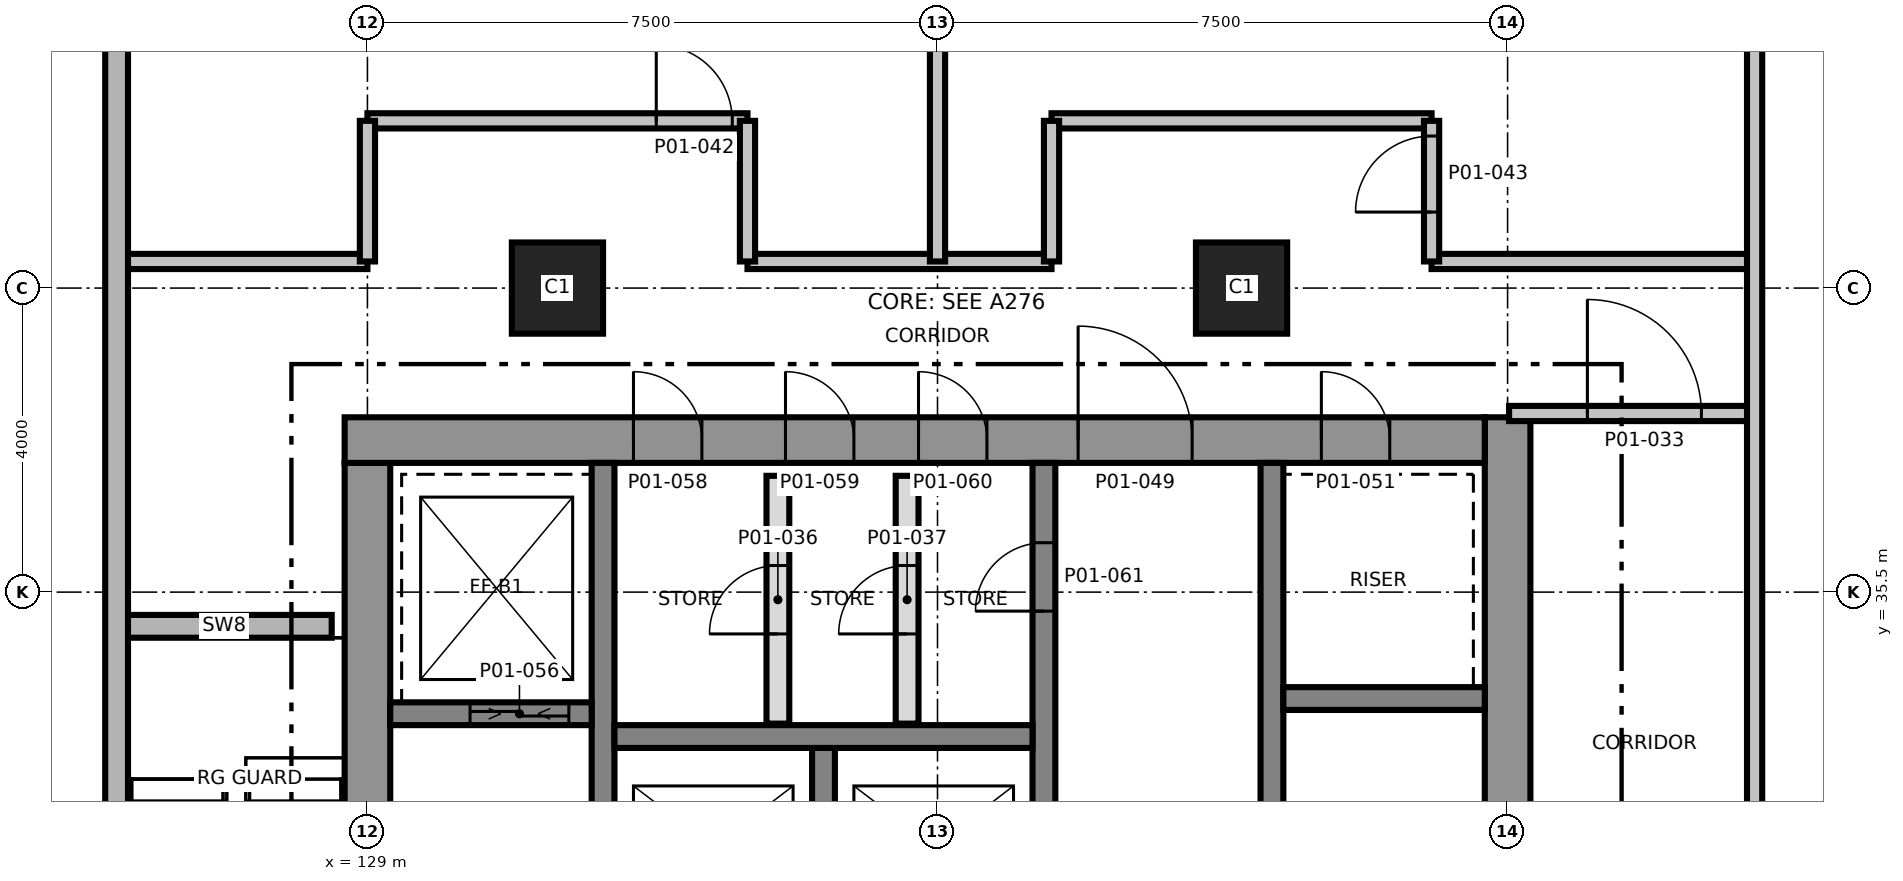
"""IFC4 building model, lengths in metres.
Left out: names, types, materials, properties, quantities, classifications, styles, units other than length and angle.
Written with IfcOpenShell. Run it as: python <this file> out.ifc"""

import sys

from ifc_helpers import new_model, si_unit, direction, frame, frame_2d, origin, origin_2d, place, context, subcontext, project, spatial, rectangle, extrude, element, fill, save


model = new_model("IFC4")
c1 = context("Model", 3, precision=1e-05, world=origin(), true_north=direction((0.0, 1.0)))
c2 = subcontext(c1, "Body", "Model", "MODEL_VIEW")
j1 = project(units=[si_unit("LENGTHUNIT", "METRE"), si_unit("PLANEANGLEUNIT", "RADIAN")], contexts=[c1])
p1 = place(None, origin())
s1 = spatial("IfcSite", under=j1, at=p1, CompositionType="ELEMENT")
p2 = place(p1, origin())
s2 = spatial("IfcBuilding", under=s1, at=p2, CompositionType="ELEMENT")
p3 = place(p2, frame((0.0, 0.0, 8.0)))
s3 = spatial("IfcBuildingStorey", under=s2, at=p3, CompositionType="ELEMENT", Elevation=8.0)
p4 = place(p3, frame((129.0, 24.8, 0.0), z_axis=(0.0, 0.0, 1.0), x_axis=(0.0, 1.0, 0.0)))
e1 = element("IfcWall", 1, at=p4, inside=s3, PredefinedType="SHEAR", context=c2, shape_type="SweptSolid", body=[
    extrude(rectangle(XDim=12.4, YDim=0.6, at=frame_2d((6.2, 0.0))), origin(), (0.0, 0.0, 1.0), 5.5),
])
p5 = place(p4, frame((5.15, 0.0, 0.0)))
e2 = element("IfcOpeningElement", 2, at=p5, cuts=e1, PredefinedType="OPENING", context=c2, shape_type="SweptSolid", body=[
    extrude(rectangle(XDim=1.0, YDim=2.1, at=frame_2d((0.5, 1.05))), frame((0.0, 0.31, 0.0), z_axis=(0.0, -1.0, 0.0), x_axis=(1.0, 0.0, 0.0)), (0.0, 0.0, 1.0), 0.62),
])
p6 = place(p3, frame((144.0, 24.2, 0.0), z_axis=(0.0, 0.0, 1.0), x_axis=(0.0, 1.0, 0.0)))
e3 = element("IfcWall", 3, at=p6, inside=s3, PredefinedType="SHEAR", context=c2, shape_type="SweptSolid", body=[
    extrude(rectangle(XDim=13.6, YDim=0.6, at=frame_2d((6.8, 0.0))), origin(), (0.0, 0.0, 1.0), 5.5),
])
p7 = place(p3, frame((128.7, 37.5, 0.0), z_axis=(0.0, 0.0, 1.0), x_axis=(1.0, 0.0, 0.0)))
e4 = element("IfcWall", 4, at=p7, inside=s3, PredefinedType="SHEAR", context=c2, shape_type="SweptSolid", body=[
    extrude(rectangle(XDim=15.0, YDim=0.6, at=frame_2d((7.5, 0.0))), origin(), (0.0, 0.0, 1.0), 5.5),
])
p8 = place(p7, frame((9.65, 0.0, 0.0)))
e5 = element("IfcOpeningElement", 5, at=p8, cuts=e4, PredefinedType="OPENING", context=c2, shape_type="SweptSolid", body=[
    extrude(rectangle(XDim=1.5, YDim=2.1, at=frame_2d((0.75, 1.05))), frame((0.0, 0.31, 0.0), z_axis=(0.0, -1.0, 0.0), x_axis=(1.0, 0.0, 0.0)), (0.0, 0.0, 1.0), 0.62),
])
p9 = place(p7, frame((12.85, 0.0, 0.0)))
e6 = element("IfcOpeningElement", 6, at=p9, cuts=e4, PredefinedType="OPENING", context=c2, shape_type="SweptSolid", body=[
    extrude(rectangle(XDim=0.9, YDim=2.1, at=frame_2d((0.45, 1.05))), frame((0.0, 0.31, 0.0), z_axis=(0.0, -1.0, 0.0), x_axis=(1.0, 0.0, 0.0)), (0.0, 0.0, 1.0), 0.62),
])
p10 = place(p7, frame((3.8, 0.0, 0.0)))
e7 = element("IfcOpeningElement", 7, at=p10, cuts=e4, PredefinedType="OPENING", context=c2, shape_type="SweptSolid", body=[
    extrude(rectangle(XDim=0.9, YDim=2.1, at=frame_2d((0.45, 1.05))), frame((0.0, 0.31, 0.0), z_axis=(0.0, -1.0, 0.0), x_axis=(1.0, 0.0, 0.0)), (0.0, 0.0, 1.0), 0.62),
])
p11 = place(p7, frame((5.8, 0.0, 0.0)))
e8 = element("IfcOpeningElement", 8, at=p11, cuts=e4, PredefinedType="OPENING", context=c2, shape_type="SweptSolid", body=[
    extrude(rectangle(XDim=0.9, YDim=2.1, at=frame_2d((0.45, 1.05))), frame((0.0, 0.31, 0.0), z_axis=(0.0, -1.0, 0.0), x_axis=(1.0, 0.0, 0.0)), (0.0, 0.0, 1.0), 0.62),
])
p12 = place(p7, frame((7.55, 0.0, 0.0)))
e9 = element("IfcOpeningElement", 9, at=p12, cuts=e4, PredefinedType="OPENING", context=c2, shape_type="SweptSolid", body=[
    extrude(rectangle(XDim=0.9, YDim=2.1, at=frame_2d((0.45, 1.05))), frame((0.0, 0.31, 0.0), z_axis=(0.0, -1.0, 0.0), x_axis=(1.0, 0.0, 0.0)), (0.0, 0.0, 1.0), 0.62),
])
p13 = place(p3, frame((132.1, 24.8, 0.0), z_axis=(0.0, 0.0, 1.0), x_axis=(0.0, 1.0, 0.0)))
e10 = element("IfcWall", 10, at=p13, inside=s3, PredefinedType="SHEAR", context=c2, shape_type="SweptSolid", body=[
    extrude(rectangle(XDim=12.4, YDim=0.3, at=frame_2d((6.2, 0.0))), origin(), (0.0, 0.0, 1.0), 5.5),
])
p14 = place(p13, frame((3.9, 0.0, 0.0)))
e11 = element("IfcOpeningElement", 11, at=p14, cuts=e10, PredefinedType="OPENING", context=c2, shape_type="SweptSolid", body=[
    extrude(rectangle(XDim=1.2, YDim=2.1, at=frame_2d((0.6, 1.05))), frame((0.0, 0.16, 0.0), z_axis=(0.0, -1.0, 0.0), x_axis=(1.0, 0.0, 0.0)), (0.0, 0.0, 1.0), 0.32),
])
p15 = place(p3, frame((137.9, 24.8, 0.0), z_axis=(0.0, 0.0, 1.0), x_axis=(0.0, 1.0, 0.0)))
e12 = element("IfcWall", 12, at=p15, inside=s3, PredefinedType="SHEAR", context=c2, shape_type="SweptSolid", body=[
    extrude(rectangle(XDim=12.4, YDim=0.3, at=frame_2d((6.2, 0.0))), origin(), (0.0, 0.0, 1.0), 5.5),
])
p16 = place(p15, frame((3.95, 0.0, 0.0)))
e13 = element("IfcOpeningElement", 13, at=p16, cuts=e12, PredefinedType="OPENING", context=c2, shape_type="SweptSolid", body=[
    extrude(rectangle(XDim=1.5, YDim=2.1, at=frame_2d((0.75, 1.05))), frame((0.0, 0.16, 0.0), z_axis=(0.0, -1.0, 0.0), x_axis=(1.0, 0.0, 0.0)), (0.0, 0.0, 1.0), 0.32),
])
p17 = place(p15, frame((10.45, 0.0, 0.0)))
e14 = element("IfcOpeningElement", 14, at=p17, cuts=e12, PredefinedType="OPENING", context=c2, shape_type="SweptSolid", body=[
    extrude(rectangle(XDim=0.9, YDim=2.1, at=frame_2d((0.45, 1.05))), frame((0.0, 0.16, 0.0), z_axis=(0.0, -1.0, 0.0), x_axis=(1.0, 0.0, 0.0)), (0.0, 0.0, 1.0), 0.32),
])
p18 = place(p3, frame((140.9, 24.8, 0.0), z_axis=(0.0, 0.0, 1.0), x_axis=(0.0, 1.0, 0.0)))
e15 = element("IfcWall", 15, at=p18, inside=s3, PredefinedType="SHEAR", context=c2, shape_type="SweptSolid", body=[
    extrude(rectangle(XDim=12.4, YDim=0.3, at=frame_2d((6.2, 0.0))), origin(), (0.0, 0.0, 1.0), 5.5),
])
p19 = place(p18, frame((5.9, 0.0, 0.0)))
e16 = element("IfcOpeningElement", 16, at=p19, cuts=e15, PredefinedType="OPENING", context=c2, shape_type="SweptSolid", body=[
    extrude(rectangle(XDim=1.2, YDim=2.1, at=frame_2d((0.6, 1.05))), frame((0.0, 0.16, 0.0), z_axis=(0.0, -1.0, 0.0), x_axis=(1.0, 0.0, 0.0)), (0.0, 0.0, 1.0), 0.32),
])
p20 = place(p3, frame((135.0, 30.85, 0.0), z_axis=(0.0, 0.0, 1.0), x_axis=(0.0, 1.0, 0.0)))
e17 = element("IfcWall", 17, at=p20, inside=s3, PredefinedType="SHEAR", context=c2, shape_type="SweptSolid", body=[
    extrude(rectangle(XDim=2.6, YDim=0.3, at=frame_2d((1.3, 0.0))), origin(), (0.0, 0.0, 1.0), 5.5),
])
p21 = place(p3, frame((132.25, 33.6, 0.0), z_axis=(0.0, 0.0, 1.0), x_axis=(1.0, 0.0, 0.0)))
e18 = element("IfcWall", 18, at=p21, inside=s3, PredefinedType="SHEAR", context=c2, shape_type="SweptSolid", body=[
    extrude(rectangle(XDim=5.5, YDim=0.3, at=frame_2d((2.75, 0.0))), origin(), (0.0, 0.0, 1.0), 5.5),
])
p22 = place(p3, frame((129.3, 33.9, 0.0), z_axis=(0.0, 0.0, 1.0), x_axis=(1.0, 0.0, 0.0)))
e19 = element("IfcWall", 19, at=p22, inside=s3, PredefinedType="SHEAR", context=c2, shape_type="SweptSolid", body=[
    extrude(rectangle(XDim=2.65, YDim=0.3, at=frame_2d((1.325, 0.0))), origin(), (0.0, 0.0, 1.0), 5.5),
])
p23 = place(p22, frame((1.05, 0.0, 0.0)))
e20 = element("IfcOpeningElement", 20, at=p23, cuts=e19, PredefinedType="OPENING", context=c2, shape_type="SweptSolid", body=[
    extrude(rectangle(XDim=1.3, YDim=2.4, at=frame_2d((0.65, 1.2))), frame((0.0, 0.16, 0.0), z_axis=(0.0, -1.0, 0.0), x_axis=(1.0, 0.0, 0.0)), (0.0, 0.0, 1.0), 0.32),
])
p24 = place(p3, frame((141.05, 34.1, 0.0), z_axis=(0.0, 0.0, 1.0), x_axis=(1.0, 0.0, 0.0)))
e21 = element("IfcWall", 21, at=p24, inside=s3, PredefinedType="SHEAR", context=c2, shape_type="SweptSolid", body=[
    extrude(rectangle(XDim=2.65, YDim=0.3, at=frame_2d((1.325, 0.0))), origin(), (0.0, 0.0, 1.0), 5.5),
])
for number, where, z_axis, x_axis in (
    (22, (131.5, 39.5, 0.0), (0.0, 0.0, 1.0), (1.0, 0.0, 0.0)),
    (23, (140.5, 39.5, 0.0), (0.0, 0.0, 1.0), (1.0, 0.0, 0.0)),
):
    element("IfcColumn", number, at=place(p3, frame(where, z_axis=z_axis, x_axis=x_axis)), inside=s3, PredefinedType="COLUMN", context=c2, shape_type="SweptSolid", body=[
        extrude(rectangle(XDim=1.2, YDim=1.2, at=origin_2d()), origin(), (0.0, 0.0, 1.0), 5.5),
    ])
p25 = place(p3, frame((125.7, 35.05, 0.0), z_axis=(0.0, 0.0, 1.0), x_axis=(1.0, 0.0, 0.0)))
e24 = element("IfcWall", 24, at=p25, inside=s3, PredefinedType="SHEAR", context=c2, shape_type="SweptSolid", body=[
    extrude(rectangle(XDim=2.83, YDim=0.3, at=frame_2d((1.415, 0.0))), origin(), (0.0, 0.0, 1.0), 5.2),
])
p26 = place(p3, frame((144.02, 37.85, 0.0), z_axis=(0.0, 0.0, 1.0), x_axis=(1.0, 0.0, 0.0)))
e25 = element("IfcWall", 25, at=p26, inside=s3, PredefinedType="PARTITIONING", context=c2, shape_type="SweptSolid", body=[
    extrude(rectangle(XDim=3.23, YDim=0.2, at=frame_2d((1.615, 0.0))), origin(), (0.0, 0.0, 1.0), 5.2),
])
p27 = place(p26, frame((1.03, 0.0, 0.0)))
e26 = element("IfcOpeningElement", 26, at=p27, cuts=e25, PredefinedType="OPENING", context=c2, shape_type="SweptSolid", body=[
    extrude(rectangle(XDim=1.5, YDim=2.1, at=frame_2d((0.75, 1.05))), frame((0.0, 0.11, 0.0), z_axis=(0.0, -1.0, 0.0), x_axis=(1.0, 0.0, 0.0)), (0.0, 0.0, 1.0), 0.22),
])
p28 = place(p3, frame((125.75, 39.85, 0.0), z_axis=(0.0, 0.0, 1.0), x_axis=(1.0, 0.0, 0.0)))
e27 = element("IfcWall", 27, at=p28, inside=s3, PredefinedType="PARTITIONING", context=c2, shape_type="SweptSolid", body=[
    extrude(rectangle(XDim=3.25, YDim=0.2, at=frame_2d((1.625, 0.0))), origin(), (0.0, 0.0, 1.0), 5.2),
])
p29 = place(p3, frame((134.0, 39.85, 0.0), z_axis=(0.0, 0.0, 1.0), x_axis=(1.0, 0.0, 0.0)))
e28 = element("IfcWall", 28, at=p29, inside=s3, PredefinedType="PARTITIONING", context=c2, shape_type="SweptSolid", body=[
    extrude(rectangle(XDim=4.0, YDim=0.2, at=frame_2d((2.0, 0.0))), origin(), (0.0, 0.0, 1.0), 5.2),
])
p30 = place(p3, frame((143.0, 39.85, 0.0), z_axis=(0.0, 0.0, 1.0), x_axis=(1.0, 0.0, 0.0)))
e29 = element("IfcWall", 29, at=p30, inside=s3, PredefinedType="PARTITIONING", context=c2, shape_type="SweptSolid", body=[
    extrude(rectangle(XDim=4.25, YDim=0.2, at=frame_2d((2.125, 0.0))), origin(), (0.0, 0.0, 1.0), 5.2),
])
p31 = place(p3, frame((129.0, 41.7, 0.0), z_axis=(0.0, 0.0, 1.0), x_axis=(1.0, 0.0, 0.0)))
e30 = element("IfcWall", 30, at=p31, inside=s3, PredefinedType="PARTITIONING", context=c2, shape_type="SweptSolid", body=[
    extrude(rectangle(XDim=5.0, YDim=0.2, at=frame_2d((2.5, 0.0))), origin(), (0.0, 0.0, 1.0), 5.2),
])
p32 = place(p31, frame((3.8, 0.0, 0.0)))
e31 = element("IfcOpeningElement", 31, at=p32, cuts=e30, PredefinedType="OPENING", context=c2, shape_type="SweptSolid", body=[
    extrude(rectangle(XDim=1.0, YDim=2.1, at=frame_2d((0.5, 1.05))), frame((0.0, 0.11, 0.0), z_axis=(0.0, -1.0, 0.0), x_axis=(1.0, 0.0, 0.0)), (0.0, 0.0, 1.0), 0.22),
])
p33 = place(p3, frame((138.0, 41.7, 0.0), z_axis=(0.0, 0.0, 1.0), x_axis=(1.0, 0.0, 0.0)))
e32 = element("IfcWall", 32, at=p33, inside=s3, PredefinedType="PARTITIONING", context=c2, shape_type="SweptSolid", body=[
    extrude(rectangle(XDim=5.0, YDim=0.2, at=frame_2d((2.5, 0.0))), origin(), (0.0, 0.0, 1.0), 5.2),
])
p34 = place(p3, frame((125.7, 11.07, 0.0), z_axis=(0.0, 0.0, 1.0), x_axis=(0.0, 1.0, 0.0)))
e33 = element("IfcWall", 33, at=p34, inside=s3, PredefinedType="SHEAR", context=c2, shape_type="SweptSolid", body=[
    extrude(rectangle(XDim=38.86, YDim=0.3, at=frame_2d((19.43, 0.0))), origin(), (0.0, 0.0, 1.0), 5.2),
])
p35 = place(p34, frame((14.194, 0.0, 0.0)))
e34 = element("IfcOpeningElement", 34, at=p35, cuts=e33, PredefinedType="OPENING", context=c2, shape_type="SweptSolid", body=[
    extrude(rectangle(XDim=1.0, YDim=2.1, at=frame_2d((0.5, 1.05))), frame((0.0, 0.16, 0.0), z_axis=(0.0, -1.0, 0.0), x_axis=(1.0, 0.0, 0.0)), (0.0, 0.0, 1.0), 0.32),
])
for number, where, z_axis, x_axis in (
    (35, (129.0, 39.85, 0.0), (0.0, 0.0, 1.0), (0.0, 1.0, 0.0)),
    (36, (134.0, 39.85, 0.0), (0.0, 0.0, 1.0), (0.0, 1.0, 0.0)),
):
    element("IfcWall", number, at=place(p3, frame(where, z_axis=z_axis, x_axis=x_axis)), inside=s3, PredefinedType="PARTITIONING", context=c2, shape_type="SweptSolid", body=[
        extrude(rectangle(XDim=1.85, YDim=0.2, at=frame_2d((0.925, 0.0))), origin(), (0.0, 0.0, 1.0), 5.2),
    ])
p36 = place(p3, frame((134.4, 33.77, 0.0), z_axis=(0.0, 0.0, 1.0), x_axis=(0.0, 1.0, 0.0)))
e37 = element("IfcWall", 37, at=p36, inside=s3, PredefinedType="PARTITIONING", context=c2, shape_type="SweptSolid", body=[
    extrude(rectangle(XDim=3.26, YDim=0.3, at=frame_2d((1.63, 0.0))), origin(), (0.0, 0.0, 1.0), 5.2),
])
p37 = place(p36, frame((1.18, 0.0, 0.0)))
e38 = element("IfcOpeningElement", 38, at=p37, cuts=e37, PredefinedType="OPENING", context=c2, shape_type="SweptSolid", body=[
    extrude(rectangle(XDim=0.9, YDim=2.1, at=frame_2d((0.45, 1.05))), frame((0.0, 0.16, 0.0), z_axis=(0.0, -1.0, 0.0), x_axis=(1.0, 0.0, 0.0)), (0.0, 0.0, 1.0), 0.32),
])
p38 = place(p3, frame((136.1, 33.77, 0.0), z_axis=(0.0, 0.0, 1.0), x_axis=(0.0, 1.0, 0.0)))
e39 = element("IfcWall", 39, at=p38, inside=s3, PredefinedType="PARTITIONING", context=c2, shape_type="SweptSolid", body=[
    extrude(rectangle(XDim=3.26, YDim=0.3, at=frame_2d((1.63, 0.0))), origin(), (0.0, 0.0, 1.0), 5.2),
])
p39 = place(p38, frame((1.18, 0.0, 0.0)))
e40 = element("IfcOpeningElement", 40, at=p39, cuts=e39, PredefinedType="OPENING", context=c2, shape_type="SweptSolid", body=[
    extrude(rectangle(XDim=0.9, YDim=2.1, at=frame_2d((0.45, 1.05))), frame((0.0, 0.16, 0.0), z_axis=(0.0, -1.0, 0.0), x_axis=(1.0, 0.0, 0.0)), (0.0, 0.0, 1.0), 0.32),
])
p40 = place(p3, frame((136.5, 39.85, 0.0), z_axis=(0.0, 0.0, 1.0), x_axis=(0.0, 1.0, 0.0)))
e41 = element("IfcWall", 41, at=p40, inside=s3, PredefinedType="PARTITIONING", context=c2, shape_type="SweptSolid", body=[
    extrude(rectangle(XDim=10.08, YDim=0.2, at=frame_2d((5.04, 0.0))), origin(), (0.0, 0.0, 1.0), 5.2),
])
p41 = place(p3, frame((138.0, 39.85, 0.0), z_axis=(0.0, 0.0, 1.0), x_axis=(0.0, 1.0, 0.0)))
e42 = element("IfcWall", 42, at=p41, inside=s3, PredefinedType="PARTITIONING", context=c2, shape_type="SweptSolid", body=[
    extrude(rectangle(XDim=1.85, YDim=0.2, at=frame_2d((0.925, 0.0))), origin(), (0.0, 0.0, 1.0), 5.2),
])
p42 = place(p3, frame((143.0, 39.85, 0.0), z_axis=(0.0, 0.0, 1.0), x_axis=(0.0, 1.0, 0.0)))
e43 = element("IfcWall", 43, at=p42, inside=s3, PredefinedType="PARTITIONING", context=c2, shape_type="SweptSolid", body=[
    extrude(rectangle(XDim=1.85, YDim=0.2, at=frame_2d((0.925, 0.0))), origin(), (0.0, 0.0, 1.0), 5.2),
])
p43 = place(p42, frame((0.65, 0.0, 0.0)))
e44 = element("IfcOpeningElement", 44, at=p43, cuts=e43, PredefinedType="OPENING", context=c2, shape_type="SweptSolid", body=[
    extrude(rectangle(XDim=1.0, YDim=2.1, at=frame_2d((0.5, 1.05))), frame((0.0, 0.11, 0.0), z_axis=(0.0, -1.0, 0.0), x_axis=(1.0, 0.0, 0.0)), (0.0, 0.0, 1.0), 0.22),
])
p44 = place(p3, frame((147.25, 11.07, 0.0), z_axis=(0.0, 0.0, 1.0), x_axis=(0.0, 1.0, 0.0)))
e45 = element("IfcWall", 45, at=p44, inside=s3, PredefinedType="PARTITIONING", context=c2, shape_type="SweptSolid", body=[
    extrude(rectangle(XDim=38.86, YDim=0.2, at=frame_2d((19.43, 0.0))), origin(), (0.0, 0.0, 1.0), 5.2),
])
p45 = place(p44, frame((18.18, 0.0, 0.0)))
e46 = element("IfcOpeningElement", 46, at=p45, cuts=e45, PredefinedType="OPENING", context=c2, shape_type="SweptSolid", body=[
    extrude(rectangle(XDim=1.5, YDim=2.1, at=frame_2d((0.75, 1.05))), frame((0.0, 0.11, 0.0), z_axis=(0.0, -1.0, 0.0), x_axis=(1.0, 0.0, 0.0)), (0.0, 0.0, 1.0), 0.22),
])
p46 = place(p27, origin())
e47 = element("IfcDoor", 47, at=p46, inside=s3, OperationType="SINGLE_SWING_LEFT", PredefinedType="DOOR", context=c2, shape_type="SweptSolid", body=[
    extrude(rectangle(XDim=1.5, YDim=2.1, at=frame_2d((0.75, 1.05))), frame((0.0, 0.025, 0.0), z_axis=(0.0, -1.0, 0.0), x_axis=(1.0, 0.0, 0.0)), (0.0, 0.0, 1.0), 0.05),
])
fill(e26, e47)
p47 = place(p37, origin())
e48 = element("IfcDoor", 48, at=p47, inside=s3, OperationType="SINGLE_SWING_RIGHT", PredefinedType="DOOR", context=c2, shape_type="SweptSolid", body=[
    extrude(rectangle(XDim=0.9, YDim=2.1, at=frame_2d((0.45, 1.05))), frame((0.0, 0.025, 0.0), z_axis=(0.0, -1.0, 0.0), x_axis=(1.0, 0.0, 0.0)), (0.0, 0.0, 1.0), 0.05),
])
fill(e38, e48)
p48 = place(p39, origin())
e49 = element("IfcDoor", 49, at=p48, inside=s3, OperationType="SINGLE_SWING_LEFT", PredefinedType="DOOR", context=c2, shape_type="SweptSolid", body=[
    extrude(rectangle(XDim=0.9, YDim=2.1, at=frame_2d((0.45, 1.05))), frame((0.0, 0.025, 0.0), z_axis=(0.0, -1.0, 0.0), x_axis=(1.0, 0.0, 0.0)), (0.0, 0.0, 1.0), 0.05),
])
fill(e40, e49)
p49 = place(p32, origin())
e50 = element("IfcDoor", 50, at=p49, inside=s3, OperationType="SINGLE_SWING_RIGHT", PredefinedType="DOOR", context=c2, shape_type="SweptSolid", body=[
    extrude(rectangle(XDim=1.0, YDim=2.1, at=frame_2d((0.5, 1.05))), frame((0.0, 0.025, 0.0), z_axis=(0.0, -1.0, 0.0), x_axis=(1.0, 0.0, 0.0)), (0.0, 0.0, 1.0), 0.05),
])
fill(e31, e50)
p50 = place(p43, origin())
e51 = element("IfcDoor", 51, at=p50, inside=s3, OperationType="SINGLE_SWING_LEFT", PredefinedType="DOOR", context=c2, shape_type="SweptSolid", body=[
    extrude(rectangle(XDim=1.0, YDim=2.1, at=frame_2d((0.5, 1.05))), frame((0.0, 0.025, 0.0), z_axis=(0.0, -1.0, 0.0), x_axis=(1.0, 0.0, 0.0)), (0.0, 0.0, 1.0), 0.05),
])
fill(e44, e51)
p51 = place(p8, origin())
e52 = element("IfcDoor", 52, at=p51, inside=s3, OperationType="SINGLE_SWING_RIGHT", PredefinedType="DOOR", context=c2, shape_type="SweptSolid", body=[
    extrude(rectangle(XDim=1.5, YDim=2.1, at=frame_2d((0.75, 1.05))), frame((0.0, 0.025, 0.0), z_axis=(0.0, -1.0, 0.0), x_axis=(1.0, 0.0, 0.0)), (0.0, 0.0, 1.0), 0.05),
])
fill(e5, e52)
p52 = place(p9, origin())
e53 = element("IfcDoor", 53, at=p52, inside=s3, OperationType="SINGLE_SWING_RIGHT", PredefinedType="DOOR", context=c2, shape_type="SweptSolid", body=[
    extrude(rectangle(XDim=0.9, YDim=2.1, at=frame_2d((0.45, 1.05))), frame((0.0, 0.025, 0.0), z_axis=(0.0, -1.0, 0.0), x_axis=(1.0, 0.0, 0.0)), (0.0, 0.0, 1.0), 0.05),
])
fill(e6, e53)
p53 = place(p23, origin())
e54 = element("IfcDoor", 54, at=p53, inside=s3, OperationType="SLIDING_TO_LEFT", PredefinedType="DOOR", context=c2, shape_type="SweptSolid", body=[
    extrude(rectangle(XDim=1.3, YDim=2.4, at=frame_2d((0.65, 1.2))), frame((0.0, 0.025, 0.0), z_axis=(0.0, -1.0, 0.0), x_axis=(1.0, 0.0, 0.0)), (0.0, 0.0, 1.0), 0.05),
])
fill(e20, e54)
p54 = place(p10, origin())
e55 = element("IfcDoor", 55, at=p54, inside=s3, OperationType="SINGLE_SWING_LEFT", PredefinedType="DOOR", context=c2, shape_type="SweptSolid", body=[
    extrude(rectangle(XDim=0.9, YDim=2.1, at=frame_2d((0.45, 1.05))), frame((0.0, 0.025, 0.0), z_axis=(0.0, -1.0, 0.0), x_axis=(1.0, 0.0, 0.0)), (0.0, 0.0, 1.0), 0.05),
])
fill(e7, e55)
p55 = place(p11, origin())
e56 = element("IfcDoor", 56, at=p55, inside=s3, OperationType="SINGLE_SWING_RIGHT", PredefinedType="DOOR", context=c2, shape_type="SweptSolid", body=[
    extrude(rectangle(XDim=0.9, YDim=2.1, at=frame_2d((0.45, 1.05))), frame((0.0, 0.025, 0.0), z_axis=(0.0, -1.0, 0.0), x_axis=(1.0, 0.0, 0.0)), (0.0, 0.0, 1.0), 0.05),
])
fill(e8, e56)
p56 = place(p12, origin())
e57 = element("IfcDoor", 57, at=p56, inside=s3, OperationType="SINGLE_SWING_LEFT", PredefinedType="DOOR", context=c2, shape_type="SweptSolid", body=[
    extrude(rectangle(XDim=0.9, YDim=2.1, at=frame_2d((0.45, 1.05))), frame((0.0, 0.025, 0.0), z_axis=(0.0, -1.0, 0.0), x_axis=(1.0, 0.0, 0.0)), (0.0, 0.0, 1.0), 0.05),
])
fill(e9, e57)
p57 = place(p17, origin())
e58 = element("IfcDoor", 58, at=p57, inside=s3, OperationType="SINGLE_SWING_RIGHT", PredefinedType="DOOR", context=c2, shape_type="SweptSolid", body=[
    extrude(rectangle(XDim=0.9, YDim=2.1, at=frame_2d((0.45, 1.05))), frame((0.0, 0.025, 0.0), z_axis=(0.0, -1.0, 0.0), x_axis=(1.0, 0.0, 0.0)), (0.0, 0.0, 1.0), 0.05),
])
fill(e14, e58)
save(model, sys.argv[1])
